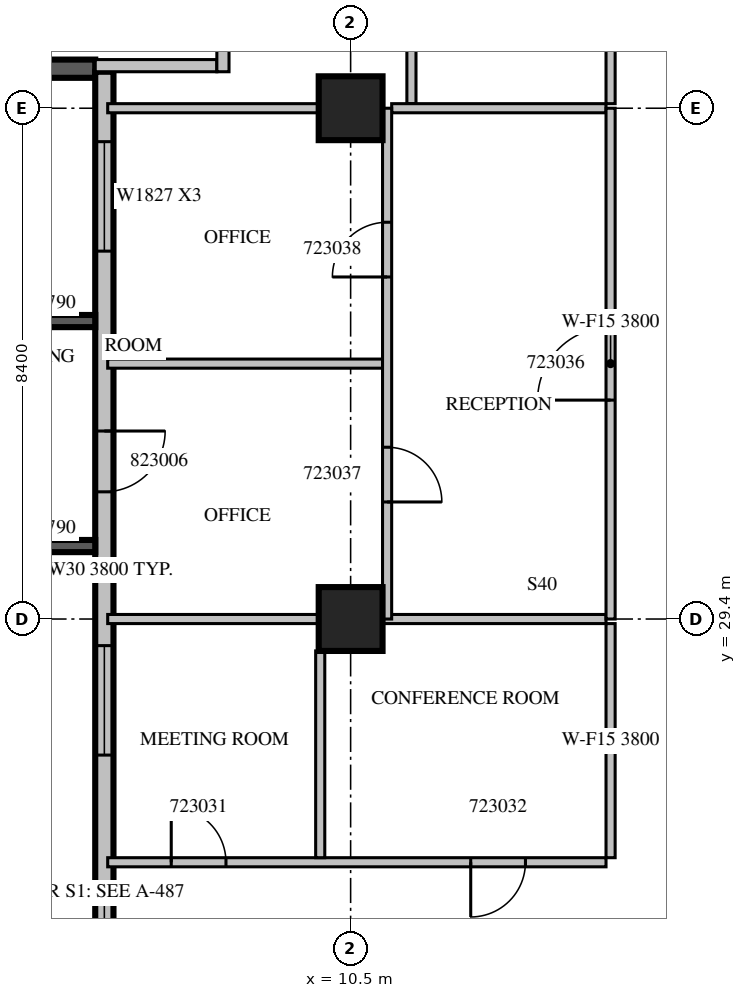
"""IFC4 building model, lengths in metres.
Left out: names, types, materials, properties, quantities, classifications, styles, units other than length and angle.
Written with IfcOpenShell. Run it as: python <this file> out.ifc"""

import sys

from ifc_helpers import new_model, si_unit, direction, frame, frame_2d, origin, origin_2d, place, context, subcontext, project, spatial, rectangle, extrude, source, transform, mapped, element, fill, save


model = new_model("IFC4")
c1 = context("Model", 3, precision=1e-05, world=origin(), true_north=direction((0.0, 1.0)))
c2 = subcontext(c1, "Body", "Model", "MODEL_VIEW")
j1 = project(units=[si_unit("LENGTHUNIT", "METRE"), si_unit("PLANEANGLEUNIT", "RADIAN")], contexts=[c1])
p1 = place(None, origin())
s1 = spatial("IfcSite", under=j1, at=p1, CompositionType="ELEMENT")
p2 = place(p1, origin())
s2 = spatial("IfcBuilding", under=s1, at=p2, CompositionType="ELEMENT")
p3 = place(p2, frame((0.0, 0.0, 107.7)))
s3 = spatial("IfcBuildingStorey", under=s2, at=p3, CompositionType="ELEMENT", Elevation=107.7)
m1 = source(origin(), c2, "Body", "SweptSolid", [
    extrude(rectangle(XDim=1.05, YDim=1.05, at=origin_2d()), origin(), (0.0, 0.0, 1.0), 4.2),
])
for number, where, z_axis, x_axis in (
    (1, (10.5, 29.4, 0.0), (0.0, 0.0, 1.0), (1.0, 0.0, 0.0)),
    (2, (10.5, 37.8, 0.0), (0.0, 0.0, 1.0), (1.0, 0.0, 0.0)),
):
    element("IfcColumn", number, at=place(p3, frame(where, z_axis=z_axis, x_axis=x_axis)), inside=s3, PredefinedType="COLUMN", context=c2, shape_type="MappedRepresentation", body=[
        mapped(m1, transform((0.0, 0.0, 0.0), scale=1.0)),
    ])
m2 = source(origin(), c2, "Body", "SweptSolid", [
    extrude(rectangle(XDim=6.1, YDim=0.3, at=frame_2d((3.05, 0.0))), origin(), (0.0, 0.0, 1.0), 3.8),
])
p4 = place(p3, frame((0.2, 38.45, 0.0), z_axis=(0.0, 0.0, 1.0), x_axis=(1.0, 0.0, 0.0)))
e3 = element("IfcWall", 3, at=p4, inside=s3, PredefinedType="SOLIDWALL", context=c2, shape_type="MappedRepresentation", body=[
    mapped(m2, transform((0.0, 0.0, 0.0), scale=1.0)),
])
p5 = place(p3, frame((6.45, 38.4, 0.0), z_axis=(0.0, 0.0, 1.0), x_axis=(0.0, -1.0, 0.0)))
e4 = element("IfcWall", 4, at=p5, inside=s3, PredefinedType="STANDARD", context=c2, shape_type="SweptSolid", body=[
    extrude(rectangle(XDim=16.4, YDim=0.3, at=frame_2d((8.2, 0.0))), origin(), (0.0, 0.0, 1.0), 3.8),
])
m3 = source(origin(), c2, "Body", "SweptSolid", [
    extrude(rectangle(XDim=1.8, YDim=2.7, at=frame_2d((0.9, 1.35))), frame((0.0, 0.16, 0.0), z_axis=(0.0, -1.0, 0.0), x_axis=(1.0, 0.0, 0.0)), (0.0, 0.0, 1.0), 0.32),
])
p6 = place(p5, frame((1.15, 0.0, 0.6)))
e5 = element("IfcOpeningElement", 5, at=p6, cuts=e4, PredefinedType="OPENING", context=c2, shape_type="MappedRepresentation", body=[
    mapped(m3, transform((0.0, 0.0, 0.0), scale=1.0)),
])
p7 = place(p5, frame((9.438, 0.0, 0.6)))
e6 = element("IfcOpeningElement", 6, at=p7, cuts=e4, PredefinedType="OPENING", context=c2, shape_type="MappedRepresentation", body=[
    mapped(m3, transform((0.0, 0.0, 0.0), scale=1.0)),
])
p8 = place(p5, frame((13.537, 0.0, 0.6)))
e7 = element("IfcOpeningElement", 7, at=p8, cuts=e4, PredefinedType="OPENING", context=c2, shape_type="MappedRepresentation", body=[
    mapped(m3, transform((0.0, 0.0, 0.0), scale=1.0)),
])
m4 = source(origin(), c2, "Body", "SweptSolid", [
    extrude(rectangle(XDim=1.0, YDim=2.1, at=frame_2d((0.5, 1.05))), frame((0.0, 0.16, 0.0), z_axis=(0.0, -1.0, 0.0), x_axis=(1.0, 0.0, 0.0)), (0.0, 0.0, 1.0), 0.32),
])
p9 = place(p5, frame((5.908, 0.0, 0.0)))
e8 = element("IfcOpeningElement", 8, at=p9, cuts=e4, PredefinedType="OPENING", context=c2, shape_type="MappedRepresentation", body=[
    mapped(m4, transform((0.0, 0.0, 0.0), scale=1.0)),
])
p10 = place(p3, frame((6.3, 34.3, 0.0), z_axis=(0.0, 0.0, 1.0), x_axis=(-1.0, 0.0, 0.0)))
e9 = element("IfcWall", 9, at=p10, inside=s3, PredefinedType="SOLIDWALL", context=c2, shape_type="SweptSolid", body=[
    extrude(rectangle(XDim=2.1, YDim=0.2, at=frame_2d((1.05, 0.0))), origin(), (0.0, 0.0, 1.0), 3.79),
])
m5 = source(origin(), c2, "Body", "SweptSolid", [
    extrude(rectangle(XDim=2.1, YDim=0.2, at=frame_2d((1.05, 0.0))), origin(), (0.0, 0.0, 1.0), 3.79),
])
p11 = place(p3, frame((6.3, 30.6, 0.0), z_axis=(0.0, 0.0, 1.0), x_axis=(-1.0, 0.0, 0.0)))
e10 = element("IfcWall", 10, at=p11, inside=s3, PredefinedType="SOLIDWALL", context=c2, shape_type="MappedRepresentation", body=[
    mapped(m5, transform((0.0, 0.0, 0.0), scale=1.0)),
])
m6 = source(origin(), c2, "Body", "SweptSolid", [
    extrude(rectangle(XDim=2.0, YDim=0.2, at=frame_2d((1.0, 0.0))), origin(), (0.0, 0.0, 1.0), 3.8),
])
p12 = place(p3, frame((6.3, 38.5, 0.0), z_axis=(0.0, 0.0, 1.0), x_axis=(1.0, 0.0, 0.0)))
e11 = element("IfcWall", 11, at=p12, inside=s3, PredefinedType="PARTITIONING", context=c2, shape_type="MappedRepresentation", body=[
    mapped(m6, transform((0.0, 0.0, 0.0), scale=1.0)),
])
m7 = source(origin(), c2, "Body", "SweptSolid", [
    extrude(rectangle(XDim=5.45, YDim=0.2, at=frame_2d((2.725, 0.0))), origin(), (0.0, 0.0, 1.0), 3.8),
])
p13 = place(p3, frame((8.4, 38.4, 0.0), z_axis=(0.0, 0.0, 1.0), x_axis=(0.0, 1.0, 0.0)))
e12 = element("IfcWall", 12, at=p13, inside=s3, PredefinedType="PARTITIONING", context=c2, shape_type="MappedRepresentation", body=[
    mapped(m7, transform((0.0, 0.0, 0.0), scale=1.0)),
])
m8 = source(origin(), c2, "Body", "SweptSolid", [
    extrude(rectangle(XDim=1.2, YDim=2.1, at=frame_2d((0.6, 1.05))), frame((0.0, 0.11, 0.0), z_axis=(0.0, -1.0, 0.0), x_axis=(1.0, 0.0, 0.0)), (0.0, 0.0, 1.0), 0.22),
])
p14 = place(p13, frame((0.4, 0.0, 0.0)))
e13 = element("IfcOpeningElement", 13, at=p14, cuts=e12, PredefinedType="OPENING", context=c2, shape_type="MappedRepresentation", body=[
    mapped(m8, transform((0.0, 0.0, 0.0), scale=1.0)),
])
m9 = source(origin(), c2, "Body", "SweptSolid", [
    extrude(rectangle(XDim=0.9, YDim=2.1, at=frame_2d((0.45, 1.05))), frame((0.0, 0.11, 0.0), z_axis=(0.0, -1.0, 0.0), x_axis=(1.0, 0.0, 0.0)), (0.0, 0.0, 1.0), 0.22),
])
p15 = place(p13, frame((3.25, 0.0, 0.0)))
e14 = element("IfcOpeningElement", 14, at=p15, cuts=e12, PredefinedType="OPENING", context=c2, shape_type="MappedRepresentation", body=[
    mapped(m9, transform((0.0, 0.0, 0.0), scale=1.0)),
])
p16 = place(p3, frame((6.505, 25.4, 0.0), z_axis=(0.0, 0.0, 1.0), x_axis=(1.0, 0.0, 0.0)))
e15 = element("IfcWall", 15, at=p16, inside=s3, PredefinedType="PARTITIONING", context=c2, shape_type="SweptSolid", body=[
    extrude(rectangle(XDim=8.195, YDim=0.15, at=frame_2d((4.098, 0.0))), origin(), (0.0, 0.0, 1.0), 3.8),
])
m10 = source(origin(), c2, "Body", "SweptSolid", [
    extrude(rectangle(XDim=0.9, YDim=2.1, at=frame_2d((0.45, 1.05))), frame((0.0, 0.085, 0.0), z_axis=(0.0, -1.0, 0.0), x_axis=(1.0, 0.0, 0.0)), (0.0, 0.0, 1.0), 0.17),
])
p17 = place(p16, frame((1.045, 0.0, 0.0)))
e16 = element("IfcOpeningElement", 16, at=p17, cuts=e15, PredefinedType="OPENING", context=c2, shape_type="MappedRepresentation", body=[
    mapped(m10, transform((0.0, 0.0, 0.0), scale=1.0)),
])
p18 = place(p16, frame((5.97, 0.0, 0.0)))
e17 = element("IfcOpeningElement", 17, at=p18, cuts=e15, PredefinedType="OPENING", context=c2, shape_type="MappedRepresentation", body=[
    mapped(m10, transform((0.0, 0.0, 0.0), scale=1.0)),
])
p19 = place(p3, frame((10.0, 25.475, 0.0), z_axis=(0.0, 0.0, 1.0), x_axis=(0.0, 1.0, 0.0)))
e18 = element("IfcWall", 18, at=p19, inside=s3, PredefinedType="PARTITIONING", context=c2, shape_type="SweptSolid", body=[
    extrude(rectangle(XDim=3.401, YDim=0.15, at=frame_2d((1.7, 0.0))), origin(), (0.0, 0.0, 1.0), 3.8),
])
m11 = source(origin(), c2, "Body", "SweptSolid", [
    extrude(rectangle(XDim=3.85, YDim=0.15, at=frame_2d((1.925, 0.0))), origin(), (0.0, 0.0, 1.0), 3.8),
])
p20 = place(p3, frame((14.775, 25.475, 0.0), z_axis=(0.0, 0.0, 1.0), x_axis=(0.0, 1.0, 0.0)))
e19 = element("IfcWall", 19, at=p20, inside=s3, PredefinedType="PARTITIONING", context=c2, shape_type="MappedRepresentation", body=[
    mapped(m11, transform((0.0, 0.0, 0.0), scale=1.0)),
])
m12 = source(origin(), c2, "Body", "SweptSolid", [
    extrude(rectangle(XDim=3.471, YDim=0.15, at=frame_2d((1.736, 0.0))), origin(), (0.0, 0.0, 1.0), 3.8),
])
p21 = place(p3, frame((9.976, 29.4, 0.0), z_axis=(0.0, 0.0, 1.0), x_axis=(-1.0, 0.0, 0.0)))
e20 = element("IfcWall", 20, at=p21, inside=s3, PredefinedType="PARTITIONING", context=c2, shape_type="MappedRepresentation", body=[
    mapped(m12, transform((0.0, 0.0, 0.0), scale=1.0)),
])
m13 = source(origin(), c2, "Body", "SweptSolid", [
    extrude(rectangle(XDim=3.676, YDim=0.15, at=frame_2d((1.838, 0.0))), origin(), (0.0, 0.0, 1.0), 3.8),
])
p22 = place(p3, frame((14.7, 29.4, 0.0), z_axis=(0.0, 0.0, 1.0), x_axis=(-1.0, 0.0, 0.0)))
e21 = element("IfcWall", 21, at=p22, inside=s3, PredefinedType="PARTITIONING", context=c2, shape_type="MappedRepresentation", body=[
    mapped(m13, transform((0.0, 0.0, 0.0), scale=1.0)),
])
m14 = source(origin(), c2, "Body", "SweptSolid", [
    extrude(rectangle(XDim=6.45, YDim=0.15, at=frame_2d((3.225, 0.0))), origin(), (0.0, 0.0, 1.0), 3.8),
])
p23 = place(p3, frame((11.5, 44.325, 0.0), z_axis=(0.0, 0.0, 1.0), x_axis=(0.0, -1.0, 0.0)))
e22 = element("IfcWall", 22, at=p23, inside=s3, PredefinedType="PARTITIONING", context=c2, shape_type="MappedRepresentation", body=[
    mapped(m14, transform((0.0, 0.0, 0.0), scale=1.0)),
])
p24 = place(p3, frame((14.775, 37.875, 0.0), z_axis=(0.0, 0.0, 1.0), x_axis=(0.0, 1.0, 0.0)))
e23 = element("IfcWall", 23, at=p24, inside=s3, PredefinedType="PARTITIONING", context=c2, shape_type="MappedRepresentation", body=[
    mapped(m14, transform((0.0, 0.0, 0.0), scale=1.0)),
])
p25 = place(p24, frame((2.737, 0.0, 0.0)))
e24 = element("IfcOpeningElement", 24, at=p25, cuts=e23, PredefinedType="OPENING", context=c2, shape_type="MappedRepresentation", body=[
    mapped(m10, transform((0.0, 0.0, 0.0), scale=1.0)),
])
m15 = source(origin(), c2, "Body", "SweptSolid", [
    extrude(rectangle(XDim=4.52, YDim=0.15, at=frame_2d((2.26, 0.0))), origin(), (0.0, 0.0, 1.0), 3.8),
])
p26 = place(p3, frame((11.025, 33.6, 0.0), z_axis=(0.0, 0.0, 1.0), x_axis=(-1.0, 0.0, 0.0)))
e25 = element("IfcWall", 25, at=p26, inside=s3, PredefinedType="PARTITIONING", context=c2, shape_type="MappedRepresentation", body=[
    mapped(m15, transform((0.0, 0.0, 0.0), scale=1.0)),
])
p27 = place(p3, frame((9.976, 37.8, 0.0), z_axis=(0.0, 0.0, 1.0), x_axis=(-1.0, 0.0, 0.0)))
e26 = element("IfcWall", 26, at=p27, inside=s3, PredefinedType="PARTITIONING", context=c2, shape_type="MappedRepresentation", body=[
    mapped(m12, transform((0.0, 0.0, 0.0), scale=1.0)),
])
m16 = source(origin(), c2, "Body", "SweptSolid", [
    extrude(rectangle(XDim=3.525, YDim=0.15, at=frame_2d((1.762, 0.0))), origin(), (0.0, 0.0, 1.0), 3.8),
])
p28 = place(p3, frame((14.7, 37.8, 0.0), z_axis=(0.0, 0.0, 1.0), x_axis=(-1.0, 0.0, 0.0)))
e27 = element("IfcWall", 27, at=p28, inside=s3, PredefinedType="PARTITIONING", context=c2, shape_type="MappedRepresentation", body=[
    mapped(m16, transform((0.0, 0.0, 0.0), scale=1.0)),
])
m17 = source(origin(), c2, "Body", "SweptSolid", [
    extrude(rectangle(XDim=8.4, YDim=0.15, at=frame_2d((4.2, 0.0))), origin(), (0.0, 0.0, 1.0), 3.8),
])
p29 = place(p3, frame((11.1, 29.4, 0.0), z_axis=(0.0, 0.0, 1.0), x_axis=(0.0, 1.0, 0.0)))
e28 = element("IfcWall", 28, at=p29, inside=s3, PredefinedType="PARTITIONING", context=c2, shape_type="MappedRepresentation", body=[
    mapped(m17, transform((0.0, 0.0, 0.0), scale=1.0)),
])
p30 = place(p29, frame((1.925, 0.0, 0.0)))
e29 = element("IfcOpeningElement", 29, at=p30, cuts=e28, PredefinedType="OPENING", context=c2, shape_type="MappedRepresentation", body=[
    mapped(m10, transform((0.0, 0.0, 0.0), scale=1.0)),
])
p31 = place(p29, frame((5.625, 0.0, 0.0)))
e30 = element("IfcOpeningElement", 30, at=p31, cuts=e28, PredefinedType="OPENING", context=c2, shape_type="MappedRepresentation", body=[
    mapped(m10, transform((0.0, 0.0, 0.0), scale=1.0)),
])
p32 = place(p3, frame((14.775, 29.4, 0.0), z_axis=(0.0, 0.0, 1.0), x_axis=(0.0, 1.0, 0.0)))
e31 = element("IfcWall", 31, at=p32, inside=s3, PredefinedType="PARTITIONING", context=c2, shape_type="MappedRepresentation", body=[
    mapped(m17, transform((0.0, 0.0, 0.0), scale=1.0)),
])
m18 = source(origin(), c2, "Body", "SweptSolid", [
    extrude(rectangle(XDim=1.2, YDim=2.1, at=frame_2d((0.6, 1.05))), frame((0.0, 0.085, 0.0), z_axis=(0.0, -1.0, 0.0), x_axis=(1.0, 0.0, 0.0)), (0.0, 0.0, 1.0), 0.17),
])
p33 = place(p32, frame((3.6, 0.0, 0.0)))
e32 = element("IfcOpeningElement", 32, at=p33, cuts=e31, PredefinedType="OPENING", context=c2, shape_type="MappedRepresentation", body=[
    mapped(m18, transform((0.0, 0.0, 0.0), scale=1.0)),
])
m19 = source(origin(), c2, "Body", "SweptSolid", [
    extrude(rectangle(XDim=1.8, YDim=2.7, at=frame_2d((0.9, 1.35))), frame((0.0, 0.03, 0.0), z_axis=(0.0, -1.0, 0.0), x_axis=(1.0, 0.0, 0.0)), (0.0, 0.0, 1.0), 0.06),
])
p34 = place(p6, origin())
e33 = element("IfcWindow", 33, at=p34, inside=s3, PartitioningType="SINGLE_PANEL", PredefinedType="WINDOW", context=c2, shape_type="MappedRepresentation", body=[
    mapped(m19, transform((0.0, 0.0, 0.0), scale=1.0)),
])
fill(e5, e33)
p35 = place(p7, origin())
e34 = element("IfcWindow", 34, at=p35, inside=s3, PartitioningType="SINGLE_PANEL", PredefinedType="WINDOW", context=c2, shape_type="MappedRepresentation", body=[
    mapped(m19, transform((0.0, 0.0, 0.0), scale=1.0)),
])
fill(e6, e34)
p36 = place(p8, origin())
e35 = element("IfcWindow", 35, at=p36, inside=s3, PartitioningType="SINGLE_PANEL", PredefinedType="WINDOW", context=c2, shape_type="MappedRepresentation", body=[
    mapped(m19, transform((0.0, 0.0, 0.0), scale=1.0)),
])
fill(e7, e35)
m20 = source(origin(), c2, "Body", "SweptSolid", [
    extrude(rectangle(XDim=0.9, YDim=2.1, at=frame_2d((0.45, 1.05))), frame((0.0, 0.025, 0.0), z_axis=(0.0, -1.0, 0.0), x_axis=(1.0, 0.0, 0.0)), (0.0, 0.0, 1.0), 0.05),
])
p37 = place(p17, origin())
e36 = element("IfcDoor", 36, at=p37, inside=s3, OperationType="SINGLE_SWING_LEFT", PredefinedType="DOOR", context=c2, shape_type="MappedRepresentation", body=[
    mapped(m20, transform((0.0, 0.0, 0.0), scale=1.0)),
])
fill(e16, e36)
p38 = place(p18, origin())
e37 = element("IfcDoor", 37, at=p38, inside=s3, OperationType="SINGLE_SWING_RIGHT", PredefinedType="DOOR", context=c2, shape_type="MappedRepresentation", body=[
    mapped(m20, transform((0.0, 0.0, 0.0), scale=1.0)),
])
fill(e17, e37)
m21 = source(origin(), c2, "Body", "SweptSolid", [
    extrude(rectangle(XDim=1.2, YDim=2.1, at=frame_2d((0.6, 1.05))), frame((0.0, 0.025, 0.0), z_axis=(0.0, -1.0, 0.0), x_axis=(1.0, 0.0, 0.0)), (0.0, 0.0, 1.0), 0.05),
])
p39 = place(p33, origin())
e38 = element("IfcDoor", 38, at=p39, inside=s3, OperationType="SINGLE_SWING_LEFT", PredefinedType="DOOR", context=c2, shape_type="MappedRepresentation", body=[
    mapped(m21, transform((0.0, 0.0, 0.0), scale=1.0)),
])
fill(e32, e38)
p40 = place(p30, origin())
e39 = element("IfcDoor", 39, at=p40, inside=s3, OperationType="SINGLE_SWING_RIGHT", PredefinedType="DOOR", context=c2, shape_type="MappedRepresentation", body=[
    mapped(m20, transform((0.0, 0.0, 0.0), scale=1.0)),
])
fill(e29, e39)
p41 = place(p31, origin())
e40 = element("IfcDoor", 40, at=p41, inside=s3, OperationType="SINGLE_SWING_LEFT", PredefinedType="DOOR", context=c2, shape_type="MappedRepresentation", body=[
    mapped(m20, transform((0.0, 0.0, 0.0), scale=1.0)),
])
fill(e30, e40)
m22 = source(origin(), c2, "Body", "SweptSolid", [
    extrude(rectangle(XDim=1.0, YDim=2.1, at=frame_2d((0.5, 1.05))), frame((0.0, 0.025, 0.0), z_axis=(0.0, -1.0, 0.0), x_axis=(1.0, 0.0, 0.0)), (0.0, 0.0, 1.0), 0.05),
])
p42 = place(p9, origin())
e41 = element("IfcDoor", 41, at=p42, inside=s3, OperationType="SINGLE_SWING_LEFT", PredefinedType="DOOR", context=c2, shape_type="MappedRepresentation", body=[
    mapped(m22, transform((0.0, 0.0, 0.0), scale=1.0)),
])
fill(e8, e41)
save(model, sys.argv[1])
